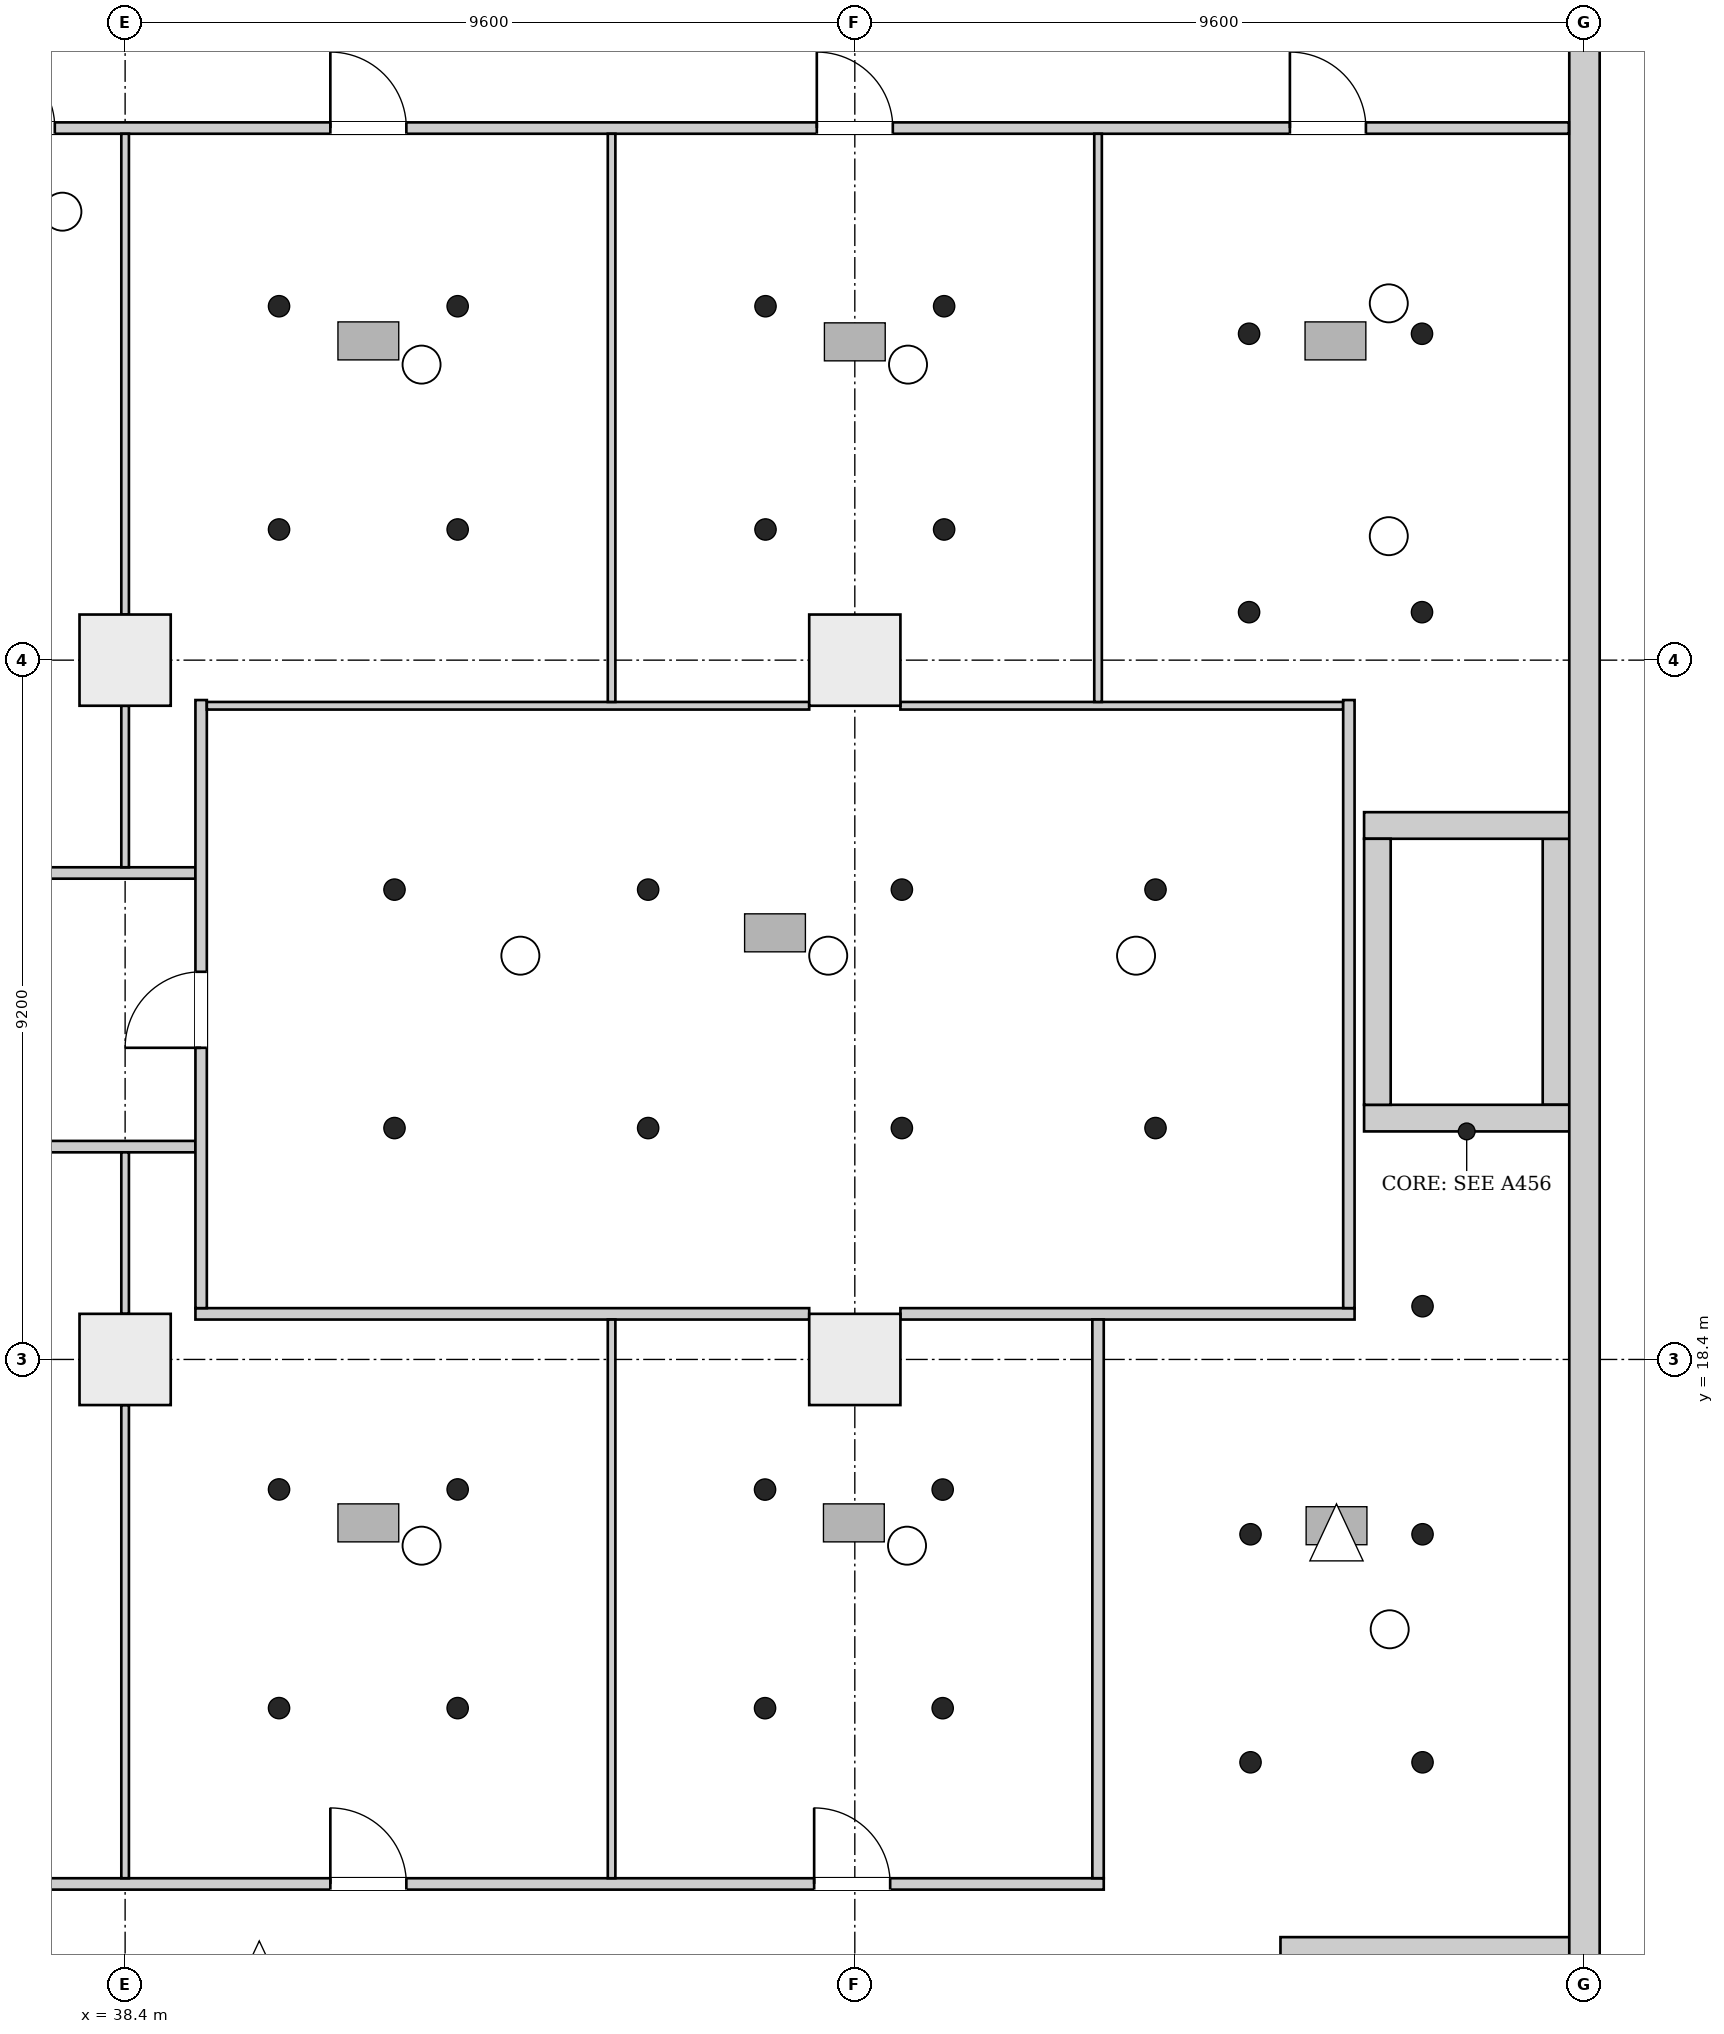
"""IFC4 building model, lengths in metres.
Left out: names, types, materials, properties, quantities, classifications, styles, units other than length and angle.
Written with IfcOpenShell. Run it as: python <this file> out.ifc"""

import sys

from ifc_helpers import new_model, si_unit, direction, frame, frame_2d, origin, origin_2d, place, context, subcontext, project, spatial, rectangle, extrude, element, fill, save


model = new_model("IFC4")
c1 = context("Model", 3, precision=1e-05, world=origin(), true_north=direction((0.0, 1.0)))
c2 = subcontext(c1, "Body", "Model", "MODEL_VIEW")
j1 = project(units=[si_unit("LENGTHUNIT", "METRE"), si_unit("PLANEANGLEUNIT", "RADIAN")], contexts=[c1])
p1 = place(None, origin())
s1 = spatial("IfcSite", under=j1, at=p1, CompositionType="ELEMENT")
p2 = place(p1, origin())
s2 = spatial("IfcBuilding", under=s1, at=p2, CompositionType="ELEMENT")
p3 = place(p2, frame((0.0, 0.0, 21.7)))
s3 = spatial("IfcBuildingStorey", under=s2, at=p3, CompositionType="ELEMENT", Elevation=21.7)
p4 = place(p3, frame((57.6, -0.2, 0.0), z_axis=(0.0, 0.0, 1.0), x_axis=(0.0, 1.0, 0.0)))
e1 = element("IfcWall", 1, at=p4, inside=s3, PredefinedType="SHEAR", context=c2, shape_type="SweptSolid", body=[
    extrude(rectangle(XDim=46.88, YDim=0.4, at=frame_2d((23.44, 0.0))), origin(), (0.0, 0.0, 1.0), 5.0),
])
p5 = place(p3, frame((53.6, 10.625, 0.0), z_axis=(0.0, 0.0, 1.0), x_axis=(1.0, 0.0, 0.0)))
e2 = element("IfcWall", 2, at=p5, inside=s3, PredefinedType="SHEAR", context=c2, shape_type="SweptSolid", body=[
    extrude(rectangle(XDim=3.8, YDim=0.35, at=frame_2d((1.9, 0.0))), origin(), (0.0, 0.0, 1.0), 5.0),
])
for number, where, z_axis, x_axis in (
    (3, (54.7, 21.575, 0.0), (0.0, 0.0, 1.0), (1.0, 0.0, 0.0)),
    (4, (54.7, 25.425, 0.0), (0.0, 0.0, 1.0), (1.0, 0.0, 0.0)),
):
    element("IfcWall", number, at=place(p3, frame(where, z_axis=z_axis, x_axis=x_axis)), inside=s3, PredefinedType="SHEAR", context=c2, shape_type="SweptSolid", body=[
        extrude(rectangle(XDim=2.7, YDim=0.35, at=frame_2d((1.35, 0.0))), origin(), (0.0, 0.0, 1.0), 5.0),
    ])
for number, where, z_axis, x_axis in (
    (5, (54.875, 21.75, 0.0), (0.0, 0.0, 1.0), (0.0, 1.0, 0.0)),
    (6, (57.225, 21.75, 0.0), (0.0, 0.0, 1.0), (0.0, 1.0, 0.0)),
):
    element("IfcWall", number, at=place(p3, frame(where, z_axis=z_axis, x_axis=x_axis)), inside=s3, PredefinedType="SHEAR", context=c2, shape_type="SweptSolid", body=[
        extrude(rectangle(XDim=3.5, YDim=0.35, at=frame_2d((1.75, 0.0))), origin(), (0.0, 0.0, 1.0), 5.0),
    ])
for number, where, z_axis, x_axis in (
    (7, (38.4, 18.4, 0.0), (0.0, 0.0, 1.0), (1.0, 0.0, 0.0)),
    (8, (48.0, 18.4, 0.0), (0.0, 0.0, 1.0), (1.0, 0.0, 0.0)),
    (9, (38.4, 27.6, 0.0), (0.0, 0.0, 1.0), (1.0, 0.0, 0.0)),
    (10, (48.0, 27.6, 0.0), (0.0, 0.0, 1.0), (1.0, 0.0, 0.0)),
):
    element("IfcColumn", number, at=place(p3, frame(where, z_axis=z_axis, x_axis=x_axis)), inside=s3, PredefinedType="COLUMN", context=c2, shape_type="SweptSolid", body=[
        extrude(rectangle(XDim=1.2, YDim=1.2, at=origin_2d()), origin(), (0.0, 0.0, 1.0), 5.0),
    ])
p6 = place(p3, frame((0.206, 24.8, 0.0), z_axis=(0.0, 0.0, 1.0), x_axis=(1.0, 0.0, 0.0)))
e11 = element("IfcWall", 11, at=p6, inside=s3, PredefinedType="PARTITIONING", context=c2, shape_type="SweptSolid", body=[
    extrude(rectangle(XDim=39.119, YDim=0.15, at=frame_2d((19.56, 0.0))), origin(), (0.0, 0.0, 1.0), 4.65),
])
p7 = place(p6, frame((15.294, 0.0, 0.0)))
e12 = element("IfcOpeningElement", 12, at=p7, cuts=e11, PredefinedType="OPENING", context=c2, shape_type="SweptSolid", body=[
    extrude(rectangle(XDim=1.0, YDim=2.1, at=frame_2d((0.5, 1.05))), frame((0.0, 0.085, 0.0), z_axis=(0.0, -1.0, 0.0), x_axis=(1.0, 0.0, 0.0)), (0.0, 0.0, 1.0), 0.17),
])
p8 = place(p6, frame((21.694, 0.0, 0.0)))
e13 = element("IfcOpeningElement", 13, at=p8, cuts=e11, PredefinedType="OPENING", context=c2, shape_type="SweptSolid", body=[
    extrude(rectangle(XDim=1.0, YDim=2.1, at=frame_2d((0.5, 1.05))), frame((0.0, 0.085, 0.0), z_axis=(0.0, -1.0, 0.0), x_axis=(1.0, 0.0, 0.0)), (0.0, 0.0, 1.0), 0.17),
])
p9 = place(p6, frame((28.094, 0.0, 0.0)))
e14 = element("IfcOpeningElement", 14, at=p9, cuts=e11, PredefinedType="OPENING", context=c2, shape_type="SweptSolid", body=[
    extrude(rectangle(XDim=1.0, YDim=2.1, at=frame_2d((0.5, 1.05))), frame((0.0, 0.085, 0.0), z_axis=(0.0, -1.0, 0.0), x_axis=(1.0, 0.0, 0.0)), (0.0, 0.0, 1.0), 0.17),
])
p10 = place(p3, frame((27.206, 11.5, 0.0), z_axis=(0.0, 0.0, 1.0), x_axis=(1.0, 0.0, 0.0)))
e15 = element("IfcWall", 15, at=p10, inside=s3, PredefinedType="PARTITIONING", context=c2, shape_type="SweptSolid", body=[
    extrude(rectangle(XDim=24.069, YDim=0.15, at=frame_2d((12.034, 0.0))), origin(), (0.0, 0.0, 1.0), 4.65),
])
p11 = place(p10, frame((13.894, 0.0, 0.0)))
e16 = element("IfcOpeningElement", 16, at=p11, cuts=e15, PredefinedType="OPENING", context=c2, shape_type="SweptSolid", body=[
    extrude(rectangle(XDim=1.0, YDim=2.1, at=frame_2d((0.5, 1.05))), frame((0.0, 0.085, 0.0), z_axis=(0.0, -1.0, 0.0), x_axis=(1.0, 0.0, 0.0)), (0.0, 0.0, 1.0), 0.17),
])
p12 = place(p10, frame((20.259, 0.0, 0.0)))
e17 = element("IfcOpeningElement", 17, at=p12, cuts=e15, PredefinedType="OPENING", context=c2, shape_type="SweptSolid", body=[
    extrude(rectangle(XDim=1.0, YDim=2.1, at=frame_2d((0.5, 1.05))), frame((0.0, 0.085, 0.0), z_axis=(0.0, -1.0, 0.0), x_axis=(1.0, 0.0, 0.0)), (0.0, 0.0, 1.0), 0.17),
])
p13 = place(p3, frame((29.075, 21.2, 0.0), z_axis=(0.0, 0.0, 1.0), x_axis=(1.0, 0.0, 0.0)))
e18 = element("IfcWall", 18, at=p13, inside=s3, PredefinedType="PARTITIONING", context=c2, shape_type="SweptSolid", body=[
    extrude(rectangle(XDim=10.25, YDim=0.15, at=frame_2d((5.125, 0.0))), origin(), (0.0, 0.0, 1.0), 4.65),
])
p14 = place(p13, frame((1.035, 0.0, 0.0)))
e19 = element("IfcOpeningElement", 19, at=p14, cuts=e18, PredefinedType="OPENING", context=c2, shape_type="SweptSolid", body=[
    extrude(rectangle(XDim=1.0, YDim=2.1, at=frame_2d((0.5, 1.05))), frame((0.0, 0.085, 0.0), z_axis=(0.0, -1.0, 0.0), x_axis=(1.0, 0.0, 0.0)), (0.0, 0.0, 1.0), 0.17),
])
p15 = place(p13, frame((5.625, 0.0, 0.0)))
e20 = element("IfcOpeningElement", 20, at=p15, cuts=e18, PredefinedType="OPENING", context=c2, shape_type="SweptSolid", body=[
    extrude(rectangle(XDim=1.0, YDim=2.1, at=frame_2d((0.5, 1.05))), frame((0.0, 0.085, 0.0), z_axis=(0.0, -1.0, 0.0), x_axis=(1.0, 0.0, 0.0)), (0.0, 0.0, 1.0), 0.17),
])
p16 = place(p3, frame((35.406, 34.6, 0.0), z_axis=(0.0, 0.0, 1.0), x_axis=(1.0, 0.0, 0.0)))
e21 = element("IfcWall", 21, at=p16, inside=s3, PredefinedType="PARTITIONING", context=c2, shape_type="SweptSolid", body=[
    extrude(rectangle(XDim=21.988, YDim=0.15, at=frame_2d((10.994, 0.0))), origin(), (0.0, 0.0, 1.0), 4.65),
])
p17 = place(p16, frame((1.069, 0.0, 0.0)))
e22 = element("IfcOpeningElement", 22, at=p17, cuts=e21, PredefinedType="OPENING", context=c2, shape_type="SweptSolid", body=[
    extrude(rectangle(XDim=1.0, YDim=2.1, at=frame_2d((0.5, 1.05))), frame((0.0, 0.085, 0.0), z_axis=(0.0, -1.0, 0.0), x_axis=(1.0, 0.0, 0.0)), (0.0, 0.0, 1.0), 0.17),
])
p18 = place(p16, frame((5.694, 0.0, 0.0)))
e23 = element("IfcOpeningElement", 23, at=p18, cuts=e21, PredefinedType="OPENING", context=c2, shape_type="SweptSolid", body=[
    extrude(rectangle(XDim=1.0, YDim=2.1, at=frame_2d((0.5, 1.05))), frame((0.0, 0.085, 0.0), z_axis=(0.0, -1.0, 0.0), x_axis=(1.0, 0.0, 0.0)), (0.0, 0.0, 1.0), 0.17),
])
p19 = place(p16, frame((12.094, 0.0, 0.0)))
e24 = element("IfcOpeningElement", 24, at=p19, cuts=e21, PredefinedType="OPENING", context=c2, shape_type="SweptSolid", body=[
    extrude(rectangle(XDim=1.0, YDim=2.1, at=frame_2d((0.5, 1.05))), frame((0.0, 0.085, 0.0), z_axis=(0.0, -1.0, 0.0), x_axis=(1.0, 0.0, 0.0)), (0.0, 0.0, 1.0), 0.17),
])
p20 = place(p16, frame((18.318, 0.0, 0.0)))
e25 = element("IfcOpeningElement", 25, at=p20, cuts=e21, PredefinedType="OPENING", context=c2, shape_type="SweptSolid", body=[
    extrude(rectangle(XDim=1.0, YDim=2.1, at=frame_2d((0.5, 1.05))), frame((0.0, 0.085, 0.0), z_axis=(0.0, -1.0, 0.0), x_axis=(1.0, 0.0, 0.0)), (0.0, 0.0, 1.0), 0.17),
])
p21 = place(p3, frame((38.4, 11.575, 0.0), z_axis=(0.0, 0.0, 1.0), x_axis=(0.0, 1.0, 0.0)))
e26 = element("IfcWall", 26, at=p21, inside=s3, PredefinedType="PARTITIONING", context=c2, shape_type="SweptSolid", body=[
    extrude(rectangle(XDim=6.225, YDim=0.1, at=frame_2d((3.113, 0.0))), origin(), (0.0, 0.0, 1.0), 4.25),
])
for number, where, z_axis, x_axis in (
    (27, (38.4, 19.0, 0.0), (0.0, 0.0, 1.0), (0.0, 1.0, 0.0)),
    (28, (38.4, 24.875, 0.0), (0.0, 0.0, 1.0), (0.0, 1.0, 0.0)),
):
    element("IfcWall", number, at=place(p3, frame(where, z_axis=z_axis, x_axis=x_axis)), inside=s3, PredefinedType="PARTITIONING", context=c2, shape_type="SweptSolid", body=[
        extrude(rectangle(XDim=2.125, YDim=0.1, at=frame_2d((1.062, 0.0))), origin(), (0.0, 0.0, 1.0), 4.25),
    ])
p22 = place(p3, frame((38.4, 28.2, 0.0), z_axis=(0.0, 0.0, 1.0), x_axis=(0.0, 1.0, 0.0)))
e29 = element("IfcWall", 29, at=p22, inside=s3, PredefinedType="PARTITIONING", context=c2, shape_type="SweptSolid", body=[
    extrude(rectangle(XDim=6.325, YDim=0.1, at=frame_2d((3.163, 0.0))), origin(), (0.0, 0.0, 1.0), 4.25),
])
p23 = place(p3, frame((39.325, 19.0, 0.0), z_axis=(0.0, 0.0, 1.0), x_axis=(1.0, 0.0, 0.0)))
e30 = element("IfcWall", 30, at=p23, inside=s3, PredefinedType="PARTITIONING", context=c2, shape_type="SweptSolid", body=[
    extrude(rectangle(XDim=8.075, YDim=0.15, at=frame_2d((4.038, 0.0))), origin(), (0.0, 0.0, 1.0), 4.65),
])
p24 = place(p3, frame((39.4, 19.075, 0.0), z_axis=(0.0, 0.0, 1.0), x_axis=(0.0, 1.0, 0.0)))
e31 = element("IfcWall", 31, at=p24, inside=s3, PredefinedType="PARTITIONING", context=c2, shape_type="SweptSolid", body=[
    extrude(rectangle(XDim=8.0, YDim=0.15, at=frame_2d((4.0, 0.0))), origin(), (0.0, 0.0, 1.0), 4.65),
])
p25 = place(p24, frame((3.425, 0.0, 0.0)))
e32 = element("IfcOpeningElement", 32, at=p25, cuts=e31, PredefinedType="OPENING", context=c2, shape_type="SweptSolid", body=[
    extrude(rectangle(XDim=1.0, YDim=2.1, at=frame_2d((0.5, 1.05))), frame((0.0, 0.085, 0.0), z_axis=(0.0, -1.0, 0.0), x_axis=(1.0, 0.0, 0.0)), (0.0, 0.0, 1.0), 0.17),
])
p26 = place(p3, frame((39.475, 27.0, 0.0), z_axis=(0.0, 0.0, 1.0), x_axis=(1.0, 0.0, 0.0)))
e33 = element("IfcWall", 33, at=p26, inside=s3, PredefinedType="PARTITIONING", context=c2, shape_type="SweptSolid", body=[
    extrude(rectangle(XDim=7.925, YDim=0.1, at=frame_2d((3.962, 0.0))), origin(), (0.0, 0.0, 1.0), 4.65),
])
p27 = place(p3, frame((44.8, 11.575, 0.0), z_axis=(0.0, 0.0, 1.0), x_axis=(0.0, 1.0, 0.0)))
e34 = element("IfcWall", 34, at=p27, inside=s3, PredefinedType="PARTITIONING", context=c2, shape_type="SweptSolid", body=[
    extrude(rectangle(XDim=7.35, YDim=0.1, at=frame_2d((3.675, 0.0))), origin(), (0.0, 0.0, 1.0), 4.65),
])
p28 = place(p3, frame((44.8, 27.05, 0.0), z_axis=(0.0, 0.0, 1.0), x_axis=(0.0, 1.0, 0.0)))
e35 = element("IfcWall", 35, at=p28, inside=s3, PredefinedType="PARTITIONING", context=c2, shape_type="SweptSolid", body=[
    extrude(rectangle(XDim=7.475, YDim=0.1, at=frame_2d((3.737, 0.0))), origin(), (0.0, 0.0, 1.0), 4.65),
])
p29 = place(p3, frame((48.6, 19.0, 0.0), z_axis=(0.0, 0.0, 1.0), x_axis=(1.0, 0.0, 0.0)))
e36 = element("IfcWall", 36, at=p29, inside=s3, PredefinedType="PARTITIONING", context=c2, shape_type="SweptSolid", body=[
    extrude(rectangle(XDim=5.975, YDim=0.15, at=frame_2d((2.987, 0.0))), origin(), (0.0, 0.0, 1.0), 4.65),
])
p30 = place(p3, frame((48.6, 27.0, 0.0), z_axis=(0.0, 0.0, 1.0), x_axis=(1.0, 0.0, 0.0)))
e37 = element("IfcWall", 37, at=p30, inside=s3, PredefinedType="PARTITIONING", context=c2, shape_type="SweptSolid", body=[
    extrude(rectangle(XDim=5.825, YDim=0.1, at=frame_2d((2.913, 0.0))), origin(), (0.0, 0.0, 1.0), 4.65),
])
p31 = place(p3, frame((51.2, 11.575, 0.0), z_axis=(0.0, 0.0, 1.0), x_axis=(0.0, 1.0, 0.0)))
e38 = element("IfcWall", 38, at=p31, inside=s3, PredefinedType="PARTITIONING", context=c2, shape_type="SweptSolid", body=[
    extrude(rectangle(XDim=7.35, YDim=0.15, at=frame_2d((3.675, 0.0))), origin(), (0.0, 0.0, 1.0), 4.65),
])
p32 = place(p3, frame((51.2, 27.05, 0.0), z_axis=(0.0, 0.0, 1.0), x_axis=(0.0, 1.0, 0.0)))
e39 = element("IfcWall", 39, at=p32, inside=s3, PredefinedType="PARTITIONING", context=c2, shape_type="SweptSolid", body=[
    extrude(rectangle(XDim=7.475, YDim=0.1, at=frame_2d((3.737, 0.0))), origin(), (0.0, 0.0, 1.0), 4.65),
])
p33 = place(p3, frame((54.5, 19.075, 0.0), z_axis=(0.0, 0.0, 1.0), x_axis=(0.0, 1.0, 0.0)))
e40 = element("IfcWall", 40, at=p33, inside=s3, PredefinedType="PARTITIONING", context=c2, shape_type="SweptSolid", body=[
    extrude(rectangle(XDim=8.0, YDim=0.15, at=frame_2d((4.0, 0.0))), origin(), (0.0, 0.0, 1.0), 4.65),
])
p34 = place(p11, origin())
e41 = element("IfcDoor", 41, at=p34, inside=s3, OperationType="SINGLE_SWING_RIGHT", PredefinedType="DOOR", context=c2, shape_type="SweptSolid", body=[
    extrude(rectangle(XDim=1.0, YDim=2.1, at=frame_2d((0.5, 1.05))), frame((0.0, 0.025, 0.0), z_axis=(0.0, -1.0, 0.0), x_axis=(1.0, 0.0, 0.0)), (0.0, 0.0, 1.0), 0.05),
])
fill(e16, e41)
p35 = place(p12, origin())
e42 = element("IfcDoor", 42, at=p35, inside=s3, OperationType="SINGLE_SWING_RIGHT", PredefinedType="DOOR", context=c2, shape_type="SweptSolid", body=[
    extrude(rectangle(XDim=1.0, YDim=2.1, at=frame_2d((0.5, 1.05))), frame((0.0, 0.025, 0.0), z_axis=(0.0, -1.0, 0.0), x_axis=(1.0, 0.0, 0.0)), (0.0, 0.0, 1.0), 0.05),
])
fill(e17, e42)
p36 = place(p17, origin())
e43 = element("IfcDoor", 43, at=p36, inside=s3, OperationType="SINGLE_SWING_RIGHT", PredefinedType="DOOR", context=c2, shape_type="SweptSolid", body=[
    extrude(rectangle(XDim=1.0, YDim=2.1, at=frame_2d((0.5, 1.05))), frame((0.0, 0.025, 0.0), z_axis=(0.0, -1.0, 0.0), x_axis=(1.0, 0.0, 0.0)), (0.0, 0.0, 1.0), 0.05),
])
fill(e22, e43)
p37 = place(p18, origin())
e44 = element("IfcDoor", 44, at=p37, inside=s3, OperationType="SINGLE_SWING_RIGHT", PredefinedType="DOOR", context=c2, shape_type="SweptSolid", body=[
    extrude(rectangle(XDim=1.0, YDim=2.1, at=frame_2d((0.5, 1.05))), frame((0.0, 0.025, 0.0), z_axis=(0.0, -1.0, 0.0), x_axis=(1.0, 0.0, 0.0)), (0.0, 0.0, 1.0), 0.05),
])
fill(e23, e44)
p38 = place(p19, origin())
e45 = element("IfcDoor", 45, at=p38, inside=s3, OperationType="SINGLE_SWING_LEFT", PredefinedType="DOOR", context=c2, shape_type="SweptSolid", body=[
    extrude(rectangle(XDim=1.0, YDim=2.1, at=frame_2d((0.5, 1.05))), frame((0.0, 0.025, 0.0), z_axis=(0.0, -1.0, 0.0), x_axis=(1.0, 0.0, 0.0)), (0.0, 0.0, 1.0), 0.05),
])
fill(e24, e45)
p39 = place(p20, origin())
e46 = element("IfcDoor", 46, at=p39, inside=s3, OperationType="SINGLE_SWING_LEFT", PredefinedType="DOOR", context=c2, shape_type="SweptSolid", body=[
    extrude(rectangle(XDim=1.0, YDim=2.1, at=frame_2d((0.5, 1.05))), frame((0.0, 0.025, 0.0), z_axis=(0.0, -1.0, 0.0), x_axis=(1.0, 0.0, 0.0)), (0.0, 0.0, 1.0), 0.05),
])
fill(e25, e46)
p40 = place(p25, origin())
e47 = element("IfcDoor", 47, at=p40, inside=s3, OperationType="SINGLE_SWING_LEFT", PredefinedType="DOOR", context=c2, shape_type="SweptSolid", body=[
    extrude(rectangle(XDim=1.0, YDim=2.1, at=frame_2d((0.5, 1.05))), frame((0.0, 0.025, 0.0), z_axis=(0.0, -1.0, 0.0), x_axis=(1.0, 0.0, 0.0)), (0.0, 0.0, 1.0), 0.05),
])
fill(e32, e47)
save(model, sys.argv[1])
